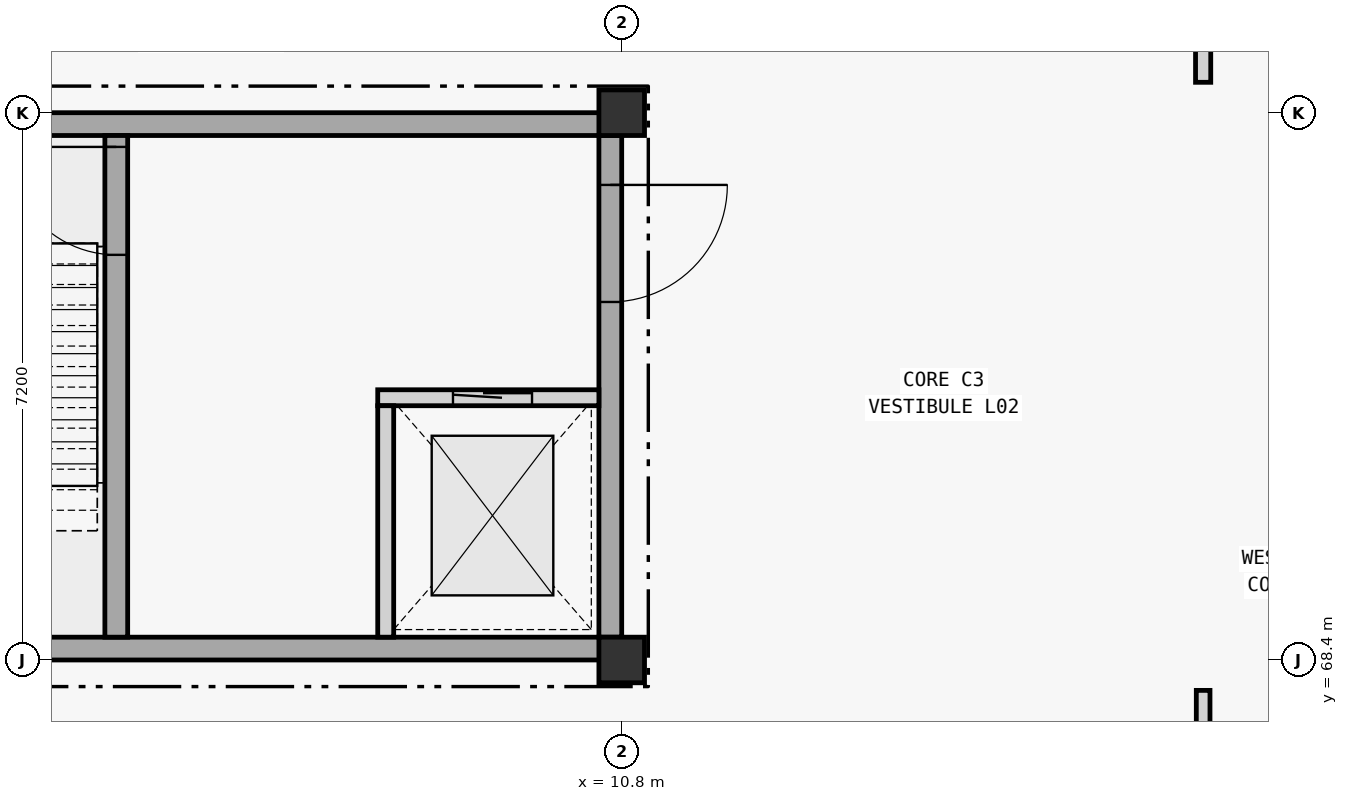
"""IFC4 building model, lengths in metres.
Left out: names, types, materials, properties, quantities, classifications, styles, units other than length and angle.
Written with IfcOpenShell. Run it as: python <this file> out.ifc"""

import sys

from ifc_helpers import new_model, si_unit, direction, frame, frame_2d, origin, origin_2d, place, context, subcontext, project, spatial, rectangle, extrude, element, fill, save


model = new_model("IFC4")
c1 = context("Model", 3, precision=1e-05, world=origin(), true_north=direction((0.0, 1.0)))
c2 = subcontext(c1, "Body", "Model", "MODEL_VIEW")
j1 = project(units=[si_unit("LENGTHUNIT", "METRE"), si_unit("PLANEANGLEUNIT", "RADIAN")], contexts=[c1])
p1 = place(None, origin())
s1 = spatial("IfcSite", under=j1, at=p1, CompositionType="ELEMENT")
p2 = place(p1, origin())
s2 = spatial("IfcBuilding", under=s1, at=p2, CompositionType="ELEMENT")
p3 = place(p2, frame((0.0, 0.0, 10.8)))
s3 = spatial("IfcBuildingStorey", under=s2, at=p3, CompositionType="ELEMENT", Elevation=10.8)
for number, where, z_axis, x_axis in (
    (1, (10.8, 68.4, 0.0), (0.0, 0.0, 1.0), (1.0, 0.0, 0.0)),
    (2, (10.8, 75.6, 0.0), (0.0, 0.0, 1.0), (1.0, 0.0, 0.0)),
):
    element("IfcColumn", number, at=place(p3, frame(where, z_axis=z_axis, x_axis=x_axis)), inside=s3, PredefinedType="COLUMN", context=c2, shape_type="SweptSolid", body=[
        extrude(rectangle(XDim=0.6, YDim=0.6, at=origin_2d()), origin(), (0.0, 0.0, 1.0), 4.2),
    ])
for number, where, z_axis, x_axis in (
    (3, (10.8, 68.55, 0.0), (0.0, 0.0, 1.0), (-1.0, 0.0, 0.0)),
    (4, (0.0, 75.45, 0.0), (0.0, 0.0, 1.0), (1.0, 0.0, 0.0)),
):
    element("IfcWall", number, at=place(p3, frame(where, z_axis=z_axis, x_axis=x_axis)), inside=s3, PredefinedType="SHEAR", context=c2, shape_type="SweptSolid", body=[
        extrude(rectangle(XDim=10.8, YDim=0.3, at=frame_2d((5.4, 0.0))), origin(), (0.0, 0.0, 1.0), 4.2),
    ])
p4 = place(p3, frame((10.65, 75.3, 0.0), z_axis=(0.0, 0.0, 1.0), x_axis=(0.0, -1.0, 0.0)))
e5 = element("IfcWall", 5, at=p4, inside=s3, PredefinedType="SHEAR", context=c2, shape_type="SweptSolid", body=[
    extrude(rectangle(XDim=6.6, YDim=0.3, at=frame_2d((3.3, 0.0))), origin(), (0.0, 0.0, 1.0), 4.2),
])
p5 = place(p4, frame((0.65, 0.0, 0.0)))
e6 = element("IfcOpeningElement", 6, at=p5, cuts=e5, PredefinedType="OPENING", context=c2, shape_type="SweptSolid", body=[
    extrude(rectangle(XDim=1.54, YDim=2.22, at=frame_2d((0.77, 1.11))), frame((0.0, 0.15, 0.0), z_axis=(0.0, -1.0, 0.0), x_axis=(1.0, 0.0, 0.0)), (0.0, 0.0, 1.0), 0.3),
])
p6 = place(p3, frame((4.15, 68.7, 0.0), z_axis=(0.0, 0.0, 1.0), x_axis=(0.0, 1.0, 0.0)))
e7 = element("IfcWall", 7, at=p6, inside=s3, PredefinedType="SHEAR", context=c2, shape_type="SweptSolid", body=[
    extrude(rectangle(XDim=6.6, YDim=0.3, at=frame_2d((3.3, 0.0))), origin(), (0.0, 0.0, 1.0), 4.2),
])
p7 = place(p6, frame((5.03, 0.0, 0.0)))
e8 = element("IfcOpeningElement", 8, at=p7, cuts=e7, PredefinedType="OPENING", context=c2, shape_type="SweptSolid", body=[
    extrude(rectangle(XDim=1.42, YDim=2.2, at=frame_2d((0.71, 1.1))), frame((0.0, 0.15, 0.0), z_axis=(0.0, -1.0, 0.0), x_axis=(1.0, 0.0, 0.0)), (0.0, 0.0, 1.0), 0.3),
])
p8 = place(p3, frame((7.59, 71.85, 0.0), z_axis=(0.0, 0.0, 1.0), x_axis=(1.0, 0.0, 0.0)))
e9 = element("IfcWall", 9, at=p8, inside=s3, PredefinedType="STANDARD", context=c2, shape_type="SweptSolid", body=[
    extrude(rectangle(XDim=2.91, YDim=0.21, at=frame_2d((1.455, 0.0))), origin(), (0.0, 0.0, 1.0), 4.2),
])
p9 = place(p8, frame((0.99, 0.0, 0.0)))
e10 = element("IfcOpeningElement", 10, at=p9, cuts=e9, PredefinedType="OPENING", context=c2, shape_type="SweptSolid", body=[
    extrude(rectangle(XDim=1.04, YDim=2.16, at=frame_2d((0.52, 1.08))), frame((0.0, 0.105, 0.0), z_axis=(0.0, -1.0, 0.0), x_axis=(1.0, 0.0, 0.0)), (0.0, 0.0, 1.0), 0.21),
])
p10 = place(p3, frame((7.695, 68.7, 0.0), z_axis=(0.0, 0.0, 1.0), x_axis=(0.0, 1.0, 0.0)))
e11 = element("IfcWall", 11, at=p10, inside=s3, PredefinedType="STANDARD", context=c2, shape_type="SweptSolid", body=[
    extrude(rectangle(XDim=3.045, YDim=0.21, at=frame_2d((1.522, 0.0))), origin(), (0.0, 0.0, 1.0), 4.2),
])
p11 = place(p3, frame((18.45, 47.3, 0.0), z_axis=(0.0, 0.0, 1.0), x_axis=(0.0, 1.0, 0.0)))
e12 = element("IfcWall", 12, at=p11, inside=s3, PredefinedType="STANDARD", context=c2, shape_type="SweptSolid", body=[
    extrude(rectangle(XDim=20.7, YDim=0.18, at=frame_2d((10.35, 0.0))), origin(), (0.0, 0.0, 1.0), 3.04),
])
p12 = place(p11, frame((9.57, 0.0, 0.0)))
e13 = element("IfcOpeningElement", 13, at=p12, cuts=e12, PredefinedType="OPENING", context=c2, shape_type="SweptSolid", body=[
    extrude(rectangle(XDim=1.56, YDim=2.25, at=frame_2d((0.78, 1.125))), frame((0.0, 0.09, 0.0), z_axis=(0.0, -1.0, 0.0), x_axis=(1.0, 0.0, 0.0)), (0.0, 0.0, 1.0), 0.18),
])
p13 = place(p3, frame((18.45, 76.0, 0.0), z_axis=(0.0, 0.0, 1.0), x_axis=(0.0, 1.0, 0.0)))
e14 = element("IfcWall", 14, at=p13, inside=s3, PredefinedType="STANDARD", context=c2, shape_type="SweptSolid", body=[
    extrude(rectangle(XDim=20.8, YDim=0.2, at=frame_2d((10.4, 0.0))), origin(), (0.0, 0.0, 1.0), 3.04),
])
p14 = place(p13, frame((9.57, 0.0, 0.0)))
e15 = element("IfcOpeningElement", 15, at=p14, cuts=e14, PredefinedType="OPENING", context=c2, shape_type="SweptSolid", body=[
    extrude(rectangle(XDim=1.66, YDim=2.32, at=frame_2d((0.83, 1.16))), frame((0.0, 0.1, 0.0), z_axis=(0.0, -1.0, 0.0), x_axis=(1.0, 0.0, 0.0)), (0.0, 0.0, 1.0), 0.2),
])
p15 = place(p9, origin())
e16 = element("IfcDoor", 16, at=p15, inside=s3, OperationType="SLIDING_TO_LEFT", PredefinedType="DOOR", context=c2, shape_type="SweptSolid", body=[
    extrude(rectangle(XDim=1.04, YDim=2.16, at=frame_2d((0.52, 1.08))), frame((0.0, 0.025, 0.0), z_axis=(0.0, -1.0, 0.0), x_axis=(1.0, 0.0, 0.0)), (0.0, 0.0, 1.0), 0.05),
])
fill(e10, e16)
p16 = place(p7, origin())
e17 = element("IfcDoor", 17, at=p16, inside=s3, OperationType="SINGLE_SWING_RIGHT", PredefinedType="DOOR", context=c2, shape_type="SweptSolid", body=[
    extrude(rectangle(XDim=1.42, YDim=2.2, at=frame_2d((0.71, 1.1))), frame((0.0, 0.025, 0.0), z_axis=(0.0, -1.0, 0.0), x_axis=(1.0, 0.0, 0.0)), (0.0, 0.0, 1.0), 0.05),
])
fill(e8, e17)
p17 = place(p5, origin())
e18 = element("IfcDoor", 18, at=p17, inside=s3, OperationType="SINGLE_SWING_LEFT", PredefinedType="DOOR", context=c2, shape_type="SweptSolid", body=[
    extrude(rectangle(XDim=1.54, YDim=2.22, at=frame_2d((0.77, 1.11))), frame((0.0, 0.025, 0.0), z_axis=(0.0, -1.0, 0.0), x_axis=(1.0, 0.0, 0.0)), (0.0, 0.0, 1.0), 0.05),
])
fill(e6, e18)
save(model, sys.argv[1])
